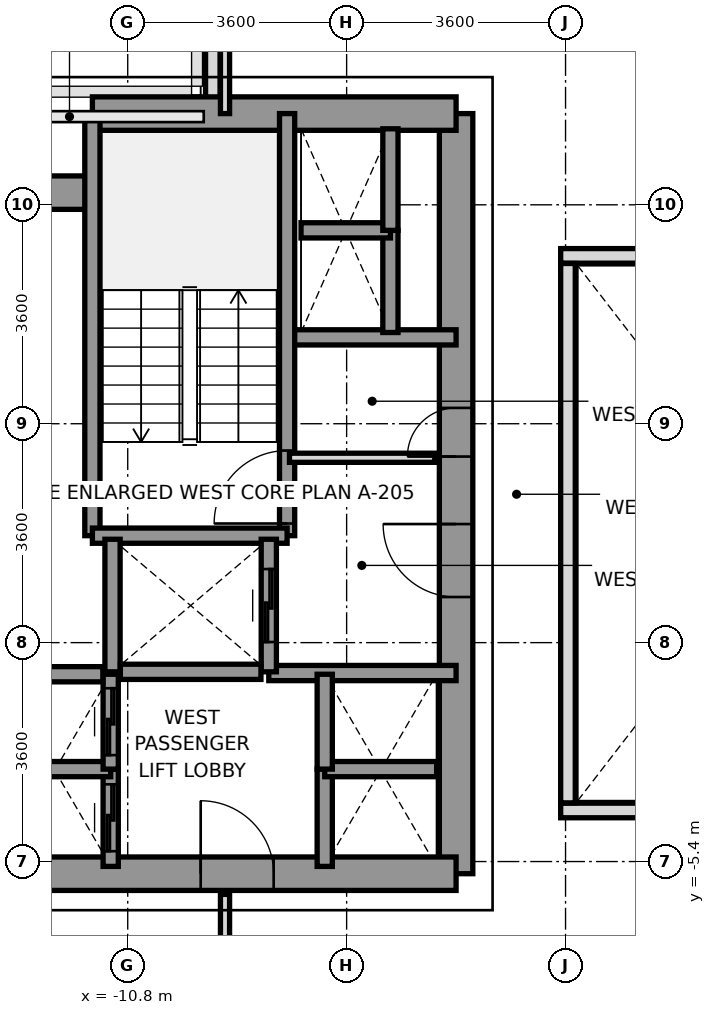
"""IFC4 building model, lengths in metres.
Left out: names, types, materials, properties, quantities, classifications, styles, units other than length and angle.
Written with IfcOpenShell. Run it as: python <this file> out.ifc"""

import sys

from ifc_helpers import new_model, si_unit, direction, frame, frame_2d, origin, place, context, subcontext, project, spatial, rectangle, extrude, source, transform, mapped, element, fill, save


model = new_model("IFC4")
c1 = context("Model", 3, precision=1e-05, world=origin(), true_north=direction((0.0, 1.0)))
c2 = subcontext(c1, "Body", "Model", "MODEL_VIEW")
j1 = project(units=[si_unit("LENGTHUNIT", "METRE"), si_unit("PLANEANGLEUNIT", "RADIAN")], contexts=[c1])
p1 = place(None, origin())
s1 = spatial("IfcSite", under=j1, at=p1, CompositionType="ELEMENT")
p2 = place(p1, origin())
s2 = spatial("IfcBuilding", under=s1, at=p2, CompositionType="ELEMENT")
p3 = place(p2, frame((0.0, 0.0, 71.4)))
s3 = spatial("IfcBuildingStorey", under=s2, at=p3, CompositionType="ELEMENT", Elevation=71.4)
p4 = place(p3, frame((-9.4, 6.953, 0.0), z_axis=(0.0, 0.0, 1.0), x_axis=(0.0, 1.0, 0.0)))
e1 = element("IfcWall", 1, at=p4, inside=s3, PredefinedType="PARAPET", context=c2, shape_type="SweptSolid", body=[
    extrude(rectangle(XDim=1.444, YDim=0.24, at=frame_2d((0.722, 0.0))), origin(), (0.0, 0.0, 1.0), 1.15),
])
p5 = place(p3, frame((-5.4, -5.6, 0.0), z_axis=(0.0, 0.0, 1.0), x_axis=(0.0, 1.0, 0.0)))
e2 = element("IfcWall", 2, at=p5, inside=s3, PredefinedType="SHEAR", context=c2, shape_type="SweptSolid", body=[
    extrude(rectangle(XDim=12.5, YDim=0.55, at=frame_2d((6.25, 0.0))), origin(), (0.0, 0.0, 1.0), 3.2),
])
p6 = place(p5, frame((4.55, 0.0, 0.0)))
e3 = element("IfcOpeningElement", 3, at=p6, cuts=e2, PredefinedType="OPENING", context=c2, shape_type="SweptSolid", body=[
    extrude(rectangle(XDim=1.2, YDim=2.2, at=frame_2d((0.6, 1.1))), frame((0.0, 0.285, 0.0), z_axis=(0.0, -1.0, 0.0), x_axis=(1.0, 0.0, 0.0)), (0.0, 0.0, 1.0), 0.57),
])
p7 = place(p5, frame((6.86, 0.0, 0.0)))
e4 = element("IfcOpeningElement", 4, at=p7, cuts=e2, PredefinedType="OPENING", context=c2, shape_type="SweptSolid", body=[
    extrude(rectangle(XDim=0.8, YDim=2.1, at=frame_2d((0.4, 1.05))), frame((0.0, 0.285, 0.0), z_axis=(0.0, -1.0, 0.0), x_axis=(1.0, 0.0, 0.0)), (0.0, 0.0, 1.0), 0.57),
])
p8 = place(p3, frame((-11.381, 6.9, 0.0), z_axis=(0.0, 0.0, 1.0), x_axis=(1.0, 0.0, 0.0)))
e5 = element("IfcWall", 5, at=p8, inside=s3, PredefinedType="SHEAR", context=c2, shape_type="SweptSolid", body=[
    extrude(rectangle(XDim=5.981, YDim=0.55, at=frame_2d((2.991, 0.0))), origin(), (0.0, 0.0, 1.0), 3.2),
])
p9 = place(p3, frame((-13.2, 5.6, 0.0), z_axis=(0.0, 0.0, 1.0), x_axis=(1.0, 0.0, 0.0)))
e6 = element("IfcWall", 6, at=p9, inside=s3, PredefinedType="SHEAR", context=c2, shape_type="SweptSolid", body=[
    extrude(rectangle(XDim=1.819, YDim=0.55, at=frame_2d((0.909, 0.0))), origin(), (0.0, 0.0, 1.0), 3.2),
])
p10 = place(p3, frame((-13.2, -5.6, 0.0), z_axis=(0.0, 0.0, 1.0), x_axis=(1.0, 0.0, 0.0)))
e7 = element("IfcWall", 7, at=p10, inside=s3, PredefinedType="SHEAR", context=c2, shape_type="SweptSolid", body=[
    extrude(rectangle(XDim=7.8, YDim=0.55, at=frame_2d((3.9, 0.0))), origin(), (0.0, 0.0, 1.0), 3.2),
])
p11 = place(p10, frame((3.6, 0.0, 0.0)))
e8 = element("IfcOpeningElement", 8, at=p11, cuts=e7, PredefinedType="OPENING", context=c2, shape_type="SweptSolid", body=[
    extrude(rectangle(XDim=1.2, YDim=2.2, at=frame_2d((0.6, 1.1))), frame((0.0, 0.285, 0.0), z_axis=(0.0, -1.0, 0.0), x_axis=(1.0, 0.0, 0.0)), (0.0, 0.0, 1.0), 0.57),
])
p12 = place(p3, frame((-8.18, 3.22, 0.0), z_axis=(0.0, 0.0, 1.0), x_axis=(1.0, 0.0, 0.0)))
e9 = element("IfcWall", 9, at=p12, inside=s3, PredefinedType="SOLIDWALL", context=c2, shape_type="SweptSolid", body=[
    extrude(rectangle(XDim=2.78, YDim=0.25, at=frame_2d((1.39, 0.0))), origin(), (0.0, 0.0, 1.0), 3.2),
])
p13 = place(p3, frame((-8.48, -2.3, 0.0), z_axis=(0.0, 0.0, 1.0), x_axis=(1.0, 0.0, 0.0)))
e10 = element("IfcWall", 10, at=p13, inside=s3, PredefinedType="SOLIDWALL", context=c2, shape_type="SweptSolid", body=[
    extrude(rectangle(XDim=3.08, YDim=0.25, at=frame_2d((1.54, 0.0))), origin(), (0.0, 0.0, 1.0), 3.2),
])
p14 = place(p3, frame((-8.179, -0.041, 0.0), z_axis=(0.0, 0.0, 1.0), x_axis=(0.0, 1.0, 0.0)))
e11 = element("IfcWall", 11, at=p14, inside=s3, PredefinedType="SOLIDWALL", context=c2, shape_type="SweptSolid", body=[
    extrude(rectangle(XDim=6.941, YDim=0.25, at=frame_2d((3.47, 0.0))), origin(), (0.0, 0.0, 1.0), 3.2),
])
p15 = place(p14, frame((0.2, 0.0, 0.0)))
e12 = element("IfcOpeningElement", 12, at=p15, cuts=e11, PredefinedType="OPENING", context=c2, shape_type="SweptSolid", body=[
    extrude(rectangle(XDim=1.2, YDim=2.2, at=frame_2d((0.6, 1.1))), frame((0.0, 0.135, 0.0), z_axis=(0.0, -1.0, 0.0), x_axis=(1.0, 0.0, 0.0)), (0.0, 0.0, 1.0), 0.27),
])
p16 = place(p3, frame((-11.381, -0.041, 0.0), z_axis=(0.0, 0.0, 1.0), x_axis=(0.0, 1.0, 0.0)))
e13 = element("IfcWall", 13, at=p16, inside=s3, PredefinedType="SOLIDWALL", context=c2, shape_type="SweptSolid", body=[
    extrude(rectangle(XDim=6.941, YDim=0.25, at=frame_2d((3.47, 0.0))), origin(), (0.0, 0.0, 1.0), 3.2),
])
p17 = place(p3, frame((-11.381, -0.041, 0.0), z_axis=(0.0, 0.0, 1.0), x_axis=(1.0, 0.0, 0.0)))
e14 = element("IfcWall", 14, at=p17, inside=s3, PredefinedType="SOLIDWALL", context=c2, shape_type="SweptSolid", body=[
    extrude(rectangle(XDim=3.202, YDim=0.25, at=frame_2d((1.601, 0.0))), origin(), (0.0, 0.0, 1.0), 3.2),
])
p18 = place(p3, frame((-11.05, -2.28, 0.0), z_axis=(0.0, 0.0, 1.0), x_axis=(0.0, 1.0, 0.0)))
e15 = element("IfcWall", 15, at=p18, inside=s3, PredefinedType="SOLIDWALL", context=c2, shape_type="SweptSolid", body=[
    extrude(rectangle(XDim=2.18, YDim=0.25, at=frame_2d((1.09, 0.0))), origin(), (0.0, 0.0, 1.0), 3.2),
])
p19 = place(p3, frame((-8.48, -2.28, 0.0), z_axis=(0.0, 0.0, 1.0), x_axis=(0.0, 1.0, 0.0)))
e16 = element("IfcWall", 16, at=p19, inside=s3, PredefinedType="SOLIDWALL", context=c2, shape_type="SweptSolid", body=[
    extrude(rectangle(XDim=2.18, YDim=0.25, at=frame_2d((1.09, 0.0))), origin(), (0.0, 0.0, 1.0), 3.2),
])
p20 = place(p19, frame((0.49, 0.0, 0.0)))
e17 = element("IfcOpeningElement", 17, at=p20, cuts=e16, PredefinedType="OPENING", context=c2, shape_type="SweptSolid", body=[
    extrude(rectangle(XDim=1.2, YDim=2.2, at=frame_2d((0.6, 1.1))), frame((0.0, 0.135, 0.0), z_axis=(0.0, -1.0, 0.0), x_axis=(1.0, 0.0, 0.0)), (0.0, 0.0, 1.0), 0.27),
])
p21 = place(p3, frame((-10.921, -2.28, 0.0), z_axis=(0.0, 0.0, 1.0), x_axis=(1.0, 0.0, 0.0)))
e18 = element("IfcWall", 18, at=p21, inside=s3, PredefinedType="SOLIDWALL", context=c2, shape_type="SweptSolid", body=[
    extrude(rectangle(XDim=2.312, YDim=0.25, at=frame_2d((1.156, 0.0))), origin(), (0.0, 0.0, 1.0), 3.2),
])
p22 = place(p3, frame((-11.08, -5.48, 0.0), z_axis=(0.0, 0.0, 1.0), x_axis=(0.0, 1.0, 0.0)))
e19 = element("IfcWall", 19, at=p22, inside=s3, PredefinedType="SOLIDWALL", context=c2, shape_type="SweptSolid", body=[
    extrude(rectangle(XDim=1.6, YDim=0.25, at=frame_2d((0.8, 0.0))), origin(), (0.0, 0.0, 1.0), 3.2),
])
p23 = place(p22, frame((0.25, 0.0, 0.0)))
e20 = element("IfcOpeningElement", 20, at=p23, cuts=e19, PredefinedType="OPENING", context=c2, shape_type="SweptSolid", body=[
    extrude(rectangle(XDim=1.1, YDim=2.2, at=frame_2d((0.55, 1.1))), frame((0.0, 0.135, 0.0), z_axis=(0.0, -1.0, 0.0), x_axis=(1.0, 0.0, 0.0)), (0.0, 0.0, 1.0), 0.27),
])
p24 = place(p3, frame((-12.92, -3.88, 0.0), z_axis=(0.0, 0.0, 1.0), x_axis=(1.0, 0.0, 0.0)))
e21 = element("IfcWall", 21, at=p24, inside=s3, PredefinedType="SOLIDWALL", context=c2, shape_type="SweptSolid", body=[
    extrude(rectangle(XDim=1.84, YDim=0.25, at=frame_2d((0.92, 0.0))), origin(), (0.0, 0.0, 1.0), 3.2),
])
p25 = place(p3, frame((-11.08, -3.88, 0.0), z_axis=(0.0, 0.0, 1.0), x_axis=(0.0, 1.0, 0.0)))
e22 = element("IfcWall", 22, at=p25, inside=s3, PredefinedType="SOLIDWALL", context=c2, shape_type="SweptSolid", body=[
    extrude(rectangle(XDim=1.56, YDim=0.25, at=frame_2d((0.78, 0.0))), origin(), (0.0, 0.0, 1.0), 3.2),
])
p26 = place(p25, frame((0.23, 0.0, 0.0)))
e23 = element("IfcOpeningElement", 23, at=p26, cuts=e22, PredefinedType="OPENING", context=c2, shape_type="SweptSolid", body=[
    extrude(rectangle(XDim=1.1, YDim=2.2, at=frame_2d((0.55, 1.1))), frame((0.0, 0.135, 0.0), z_axis=(0.0, -1.0, 0.0), x_axis=(1.0, 0.0, 0.0)), (0.0, 0.0, 1.0), 0.27),
])
p27 = place(p3, frame((-12.791, -2.32, 0.0), z_axis=(0.0, 0.0, 1.0), x_axis=(1.0, 0.0, 0.0)))
e24 = element("IfcWall", 24, at=p27, inside=s3, PredefinedType="SOLIDWALL", context=c2, shape_type="SweptSolid", body=[
    extrude(rectangle(XDim=1.582, YDim=0.25, at=frame_2d((0.791, 0.0))), origin(), (0.0, 0.0, 1.0), 3.2),
])
p28 = place(p3, frame((-7.56, -5.48, 0.0), z_axis=(0.0, 0.0, 1.0), x_axis=(0.0, 1.0, 0.0)))
e25 = element("IfcWall", 25, at=p28, inside=s3, PredefinedType="SOLIDWALL", context=c2, shape_type="SweptSolid", body=[
    extrude(rectangle(XDim=1.6, YDim=0.25, at=frame_2d((0.8, 0.0))), origin(), (0.0, 0.0, 1.0), 3.2),
])
p29 = place(p3, frame((-7.56, -3.88, 0.0), z_axis=(0.0, 0.0, 1.0), x_axis=(1.0, 0.0, 0.0)))
e26 = element("IfcWall", 26, at=p29, inside=s3, PredefinedType="SOLIDWALL", context=c2, shape_type="SweptSolid", body=[
    extrude(rectangle(XDim=1.84, YDim=0.25, at=frame_2d((0.92, 0.0))), origin(), (0.0, 0.0, 1.0), 3.2),
])
p30 = place(p3, frame((-7.56, -3.88, 0.0), z_axis=(0.0, 0.0, 1.0), x_axis=(0.0, 1.0, 0.0)))
e27 = element("IfcWall", 27, at=p30, inside=s3, PredefinedType="SOLIDWALL", context=c2, shape_type="SweptSolid", body=[
    extrude(rectangle(XDim=1.56, YDim=0.25, at=frame_2d((0.78, 0.0))), origin(), (0.0, 0.0, 1.0), 3.2),
])
p31 = place(p3, frame((-6.48, 3.3, 0.0), z_axis=(0.0, 0.0, 1.0), x_axis=(0.0, 1.0, 0.0)))
e28 = element("IfcWall", 28, at=p31, inside=s3, PredefinedType="SOLIDWALL", context=c2, shape_type="SweptSolid", body=[
    extrude(rectangle(XDim=1.68, YDim=0.25, at=frame_2d((0.84, 0.0))), origin(), (0.0, 0.0, 1.0), 3.2),
])
p32 = place(p3, frame((-7.95, 4.98, 0.0), z_axis=(0.0, 0.0, 1.0), x_axis=(1.0, 0.0, 0.0)))
e29 = element("IfcWall", 29, at=p32, inside=s3, PredefinedType="SOLIDWALL", context=c2, shape_type="SweptSolid", body=[
    extrude(rectangle(XDim=1.47, YDim=0.25, at=frame_2d((0.735, 0.0))), origin(), (0.0, 0.0, 1.0), 3.2),
])
p33 = place(p3, frame((-6.48, 4.98, 0.0), z_axis=(0.0, 0.0, 1.0), x_axis=(0.0, 1.0, 0.0)))
e30 = element("IfcWall", 30, at=p33, inside=s3, PredefinedType="SOLIDWALL", context=c2, shape_type="SweptSolid", body=[
    extrude(rectangle(XDim=1.67, YDim=0.25, at=frame_2d((0.835, 0.0))), origin(), (0.0, 0.0, 1.0), 3.2),
])
p34 = place(p3, frame((-8.14, 1.24, 0.0), z_axis=(0.0, 0.0, 1.0), x_axis=(1.0, 0.0, 0.0)))
e31 = element("IfcWall", 31, at=p34, inside=s3, PredefinedType="PARTITIONING", context=c2, shape_type="SweptSolid", body=[
    extrude(rectangle(XDim=2.39, YDim=0.15, at=frame_2d((1.195, 0.0))), origin(), (0.0, 0.0, 1.0), 2.3),
])
p35 = place(p3, frame((-9.2, 6.9, 0.0), z_axis=(0.0, 0.0, 1.0), x_axis=(0.0, 1.0, 0.0)))
e32 = element("IfcWall", 32, at=p35, inside=s3, PredefinedType="PARTITIONING", context=c2, shape_type="SweptSolid", body=[
    extrude(rectangle(XDim=8.78, YDim=0.15, at=frame_2d((4.39, 0.0))), origin(), (0.0, 0.0, 1.0), 2.65),
])
p36 = place(p3, frame((-9.2, -15.68, 0.0), z_axis=(0.0, 0.0, 1.0), x_axis=(0.0, 1.0, 0.0)))
e33 = element("IfcWall", 33, at=p36, inside=s3, PredefinedType="PARTITIONING", context=c2, shape_type="SweptSolid", body=[
    extrude(rectangle(XDim=9.74, YDim=0.15, at=frame_2d((4.87, 0.0))), origin(), (0.0, 0.0, 1.0), 2.65),
])
for number, where, z_axis, x_axis in (
    (34, (-3.68, -4.56, 0.0), (0.0, 0.0, 1.0), (1.0, 0.0, 0.0)),
    (35, (-3.68, 4.56, 0.0), (0.0, 0.0, 1.0), (1.0, 0.0, 0.0)),
):
    element("IfcWall", number, at=place(p3, frame(where, z_axis=z_axis, x_axis=x_axis)), inside=s3, PredefinedType="PARAPET", context=c2, shape_type="SweptSolid", body=[
        extrude(rectangle(XDim=7.36, YDim=0.24, at=frame_2d((3.68, 0.0))), origin(), (0.0, 0.0, 1.0), 1.15),
    ])
p37 = place(p3, frame((-3.56, -4.435, 0.0), z_axis=(0.0, 0.0, 1.0), x_axis=(0.0, 1.0, 0.0)))
e36 = element("IfcWall", 36, at=p37, inside=s3, PredefinedType="PARAPET", context=c2, shape_type="SweptSolid", body=[
    extrude(rectangle(XDim=8.87, YDim=0.24, at=frame_2d((4.435, 0.0))), origin(), (0.0, 0.0, 1.0), 1.15),
])
m1 = source(origin(), c2, "Body", "SweptSolid", [
    extrude(rectangle(XDim=1.2, YDim=2.2, at=frame_2d((0.6, 1.1))), frame((0.0, 0.025, 0.0), z_axis=(0.0, -1.0, 0.0), x_axis=(1.0, 0.0, 0.0)), (0.0, 0.0, 1.0), 0.05),
])
p38 = place(p15, origin())
e37 = element("IfcDoor", 37, at=p38, inside=s3, OperationType="SINGLE_SWING_LEFT", PredefinedType="DOOR", context=c2, shape_type="MappedRepresentation", body=[
    mapped(m1, transform((0.0, 0.0, 0.0), x_axis=(1.0, 0.0, 0.0), y_axis=(0.0, 1.0, 0.0), z_axis=(0.0, 0.0, 1.0), scale=1.0)),
])
fill(e12, e37)
p39 = place(p6, origin())
e38 = element("IfcDoor", 38, at=p39, inside=s3, OperationType="SINGLE_SWING_RIGHT", PredefinedType="DOOR", context=c2, shape_type="MappedRepresentation", body=[
    mapped(m1, transform((0.0, 0.0, 0.0), x_axis=(1.0, 0.0, 0.0), y_axis=(0.0, 1.0, 0.0), z_axis=(0.0, 0.0, 1.0), scale=1.0)),
])
fill(e3, e38)
p40 = place(p11, origin())
e39 = element("IfcDoor", 39, at=p40, inside=s3, OperationType="SINGLE_SWING_LEFT", PredefinedType="DOOR", context=c2, shape_type="MappedRepresentation", body=[
    mapped(m1, transform((0.0, 0.0, 0.0), x_axis=(1.0, 0.0, 0.0), y_axis=(0.0, 1.0, 0.0), z_axis=(0.0, 0.0, 1.0), scale=1.0)),
])
fill(e8, e39)
m2 = source(origin(), c2, "Body", "SweptSolid", [
    extrude(rectangle(XDim=0.8, YDim=2.1, at=frame_2d((0.4, 1.05))), frame((0.0, 0.025, 0.0), z_axis=(0.0, -1.0, 0.0), x_axis=(1.0, 0.0, 0.0)), (0.0, 0.0, 1.0), 0.05),
])
p41 = place(p7, origin())
e40 = element("IfcDoor", 40, at=p41, inside=s3, OperationType="SINGLE_SWING_LEFT", PredefinedType="DOOR", context=c2, shape_type="MappedRepresentation", body=[
    mapped(m2, transform((0.0, 0.0, 0.0), x_axis=(1.0, 0.0, 0.0), y_axis=(0.0, 1.0, 0.0), z_axis=(0.0, 0.0, 1.0), scale=1.0)),
])
fill(e4, e40)
p42 = place(p20, origin())
e41 = element("IfcDoor", 41, at=p42, inside=s3, OperationType="SLIDING_TO_RIGHT", PredefinedType="DOOR", context=c2, shape_type="MappedRepresentation", body=[
    mapped(m1, transform((0.0, 0.0, 0.0), x_axis=(1.0, 0.0, 0.0), y_axis=(0.0, 1.0, 0.0), z_axis=(0.0, 0.0, 1.0), scale=1.0)),
])
fill(e17, e41)
m3 = source(origin(), c2, "Body", "SweptSolid", [
    extrude(rectangle(XDim=1.1, YDim=2.2, at=frame_2d((0.55, 1.1))), frame((0.0, 0.025, 0.0), z_axis=(0.0, -1.0, 0.0), x_axis=(1.0, 0.0, 0.0)), (0.0, 0.0, 1.0), 0.05),
])
p43 = place(p23, origin())
e42 = element("IfcDoor", 42, at=p43, inside=s3, OperationType="SLIDING_TO_LEFT", PredefinedType="DOOR", context=c2, shape_type="MappedRepresentation", body=[
    mapped(m3, transform((0.0, 0.0, 0.0), x_axis=(1.0, 0.0, 0.0), y_axis=(0.0, 1.0, 0.0), z_axis=(0.0, 0.0, 1.0), scale=1.0)),
])
fill(e20, e42)
p44 = place(p26, origin())
e43 = element("IfcDoor", 43, at=p44, inside=s3, OperationType="SLIDING_TO_LEFT", PredefinedType="DOOR", context=c2, shape_type="MappedRepresentation", body=[
    mapped(m3, transform((0.0, 0.0, 0.0), x_axis=(1.0, 0.0, 0.0), y_axis=(0.0, 1.0, 0.0), z_axis=(0.0, 0.0, 1.0), scale=1.0)),
])
fill(e23, e43)
save(model, sys.argv[1])
